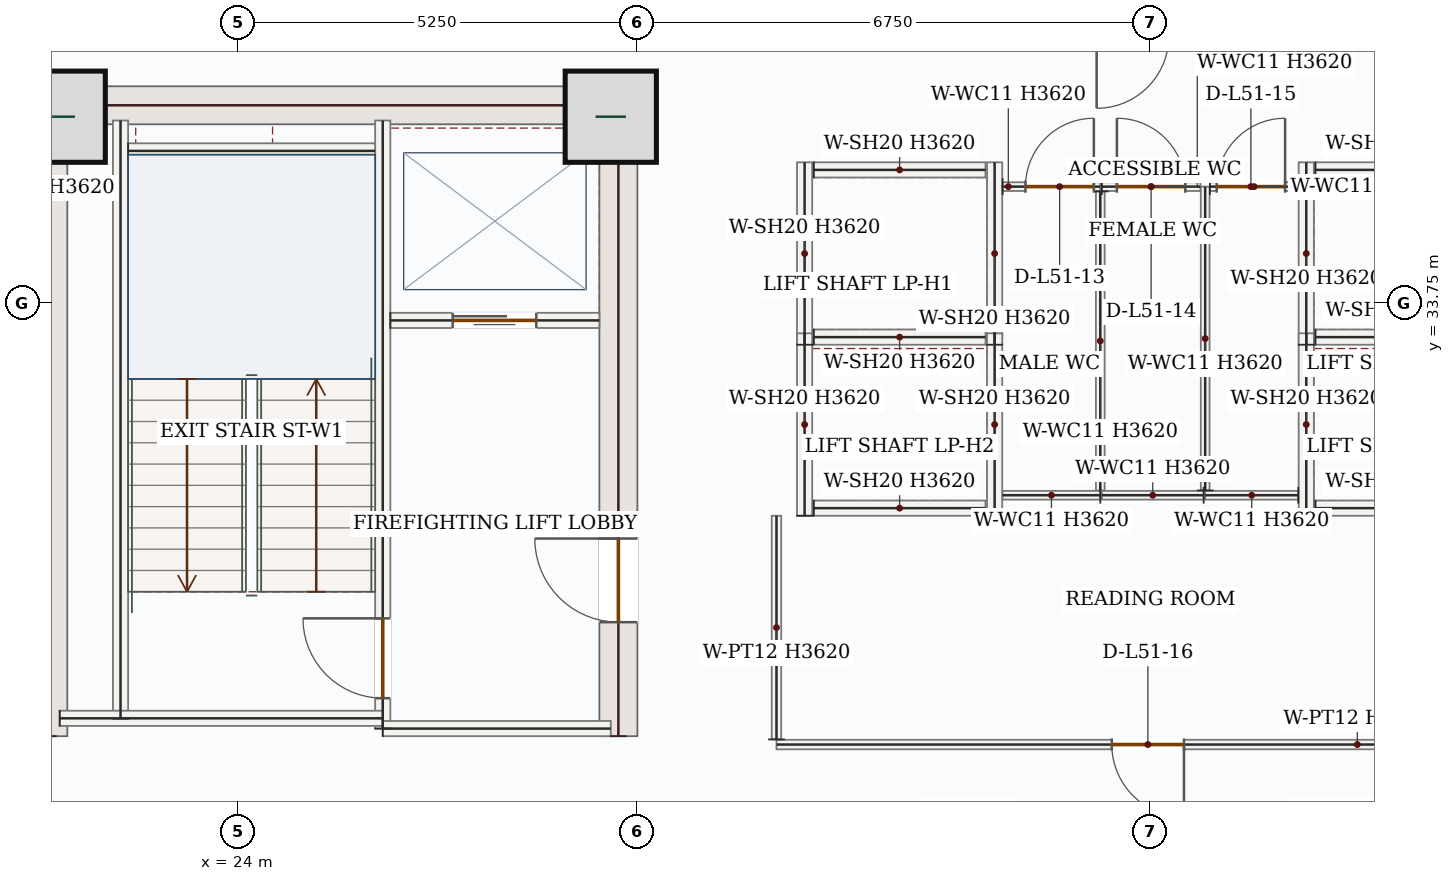
"""IFC4 building model, lengths in metres.
Left out: names, types, materials, properties, quantities, classifications, styles, units other than length and angle.
Written with IfcOpenShell. Run it as: python <this file> out.ifc"""

import sys

from ifc_helpers import new_model, si_unit, direction, frame, frame_2d, origin, origin_2d, place, context, subcontext, project, spatial, rectangle, extrude, source, transform, mapped, element, fill, save


model = new_model("IFC4")
c1 = context("Model", 3, precision=1e-05, world=origin(), true_north=direction((0.0, 1.0)))
c2 = subcontext(c1, "Body", "Model", "MODEL_VIEW")
j1 = project(units=[si_unit("LENGTHUNIT", "METRE"), si_unit("PLANEANGLEUNIT", "RADIAN")], contexts=[c1])
p1 = place(None, origin())
s1 = spatial("IfcSite", under=j1, at=p1, CompositionType="ELEMENT")
p2 = place(p1, origin())
s2 = spatial("IfcBuilding", under=s1, at=p2, CompositionType="ELEMENT")
p3 = place(p2, frame((0.0, 0.0, 217.5)))
s3 = spatial("IfcBuildingStorey", under=s2, at=p3, CompositionType="ELEMENT", Elevation=217.5)
m1 = source(origin(), c2, "Body", "SweptSolid", [
    extrude(rectangle(XDim=8.55, YDim=0.5, at=frame_2d((4.275, 0.0))), origin(), (0.0, 0.0, 1.0), 3.62),
])
p4 = place(p3, frame((21.5, 28.05, 0.0), z_axis=(0.0, 0.0, 1.0), x_axis=(0.0, 1.0, 0.0)))
e1 = element("IfcWall", 1, at=p4, inside=s3, PredefinedType="SHEAR", context=c2, shape_type="MappedRepresentation", body=[
    mapped(m1, transform((0.0, 0.0, 0.0), x_axis=(1.0, 0.0, 0.0), y_axis=(0.0, 1.0, 0.0), z_axis=(0.0, 0.0, 1.0), scale=1.0)),
])
p5 = place(p3, frame((29.0, 28.05, 0.0), z_axis=(0.0, 0.0, 1.0), x_axis=(0.0, 1.0, 0.0)))
e2 = element("IfcWall", 2, at=p5, inside=s3, PredefinedType="SHEAR", context=c2, shape_type="SweptSolid", body=[
    extrude(rectangle(XDim=8.55, YDim=0.5, at=frame_2d((4.275, 0.0))), origin(), (0.0, 0.0, 1.0), 3.62),
])
p6 = place(p5, frame((1.5, 0.0, 0.0)))
e3 = element("IfcOpeningElement", 3, at=p6, cuts=e2, PredefinedType="OPENING", context=c2, shape_type="SweptSolid", body=[
    extrude(rectangle(XDim=1.1, YDim=2.2, at=frame_2d((0.55, 1.1))), frame((0.0, 0.26, 0.0), z_axis=(0.0, -1.0, 0.0), x_axis=(1.0, 0.0, 0.0)), (0.0, 0.0, 1.0), 0.52),
])
m2 = source(origin(), c2, "Body", "SweptSolid", [
    extrude(rectangle(XDim=7.0, YDim=0.5, at=frame_2d((3.5, 0.0))), origin(), (0.0, 0.0, 1.0), 3.62),
])
p7 = place(p3, frame((21.75, 36.35, 0.0), z_axis=(0.0, 0.0, 1.0), x_axis=(1.0, 0.0, 0.0)))
e4 = element("IfcWall", 4, at=p7, inside=s3, PredefinedType="SHEAR", context=c2, shape_type="MappedRepresentation", body=[
    mapped(m2, transform((0.0, 0.0, 0.0), x_axis=(1.0, 0.0, 0.0), y_axis=(0.0, 1.0, 0.0), z_axis=(0.0, 0.0, 1.0), scale=1.0)),
])
m3 = source(origin(), c2, "Body", "SweptSolid", [
    extrude(rectangle(XDim=1.2, YDim=1.2, at=origin_2d()), origin(), (0.0, 0.0, 1.0), 3.9),
])
for number, where, z_axis, x_axis in (
    (5, (21.65, 36.2, 0.0), (0.0, 0.0, 1.0), (1.0, 0.0, 0.0)),
    (6, (28.9, 36.2, 0.0), (0.0, 0.0, 1.0), (1.0, 0.0, 0.0)),
):
    element("IfcColumn", number, at=place(p3, frame(where, z_axis=z_axis, x_axis=x_axis)), inside=s3, PredefinedType="COLUMN", context=c2, shape_type="MappedRepresentation", body=[
        mapped(m3, transform((0.0, 0.0, 0.0), x_axis=(1.0, 0.0, 0.0), y_axis=(0.0, 1.0, 0.0), z_axis=(0.0, 0.0, 1.0), scale=1.0)),
    ])
m4 = source(origin(), c2, "Body", "SweptSolid", [
    extrude(rectangle(XDim=5.258, YDim=0.28, at=frame_2d((2.629, 0.0))), origin(), (0.0, 0.0, 1.0), 3.62),
])
p8 = place(p3, frame((18.94, 35.542, 0.0), z_axis=(0.0, 0.0, 1.0), x_axis=(0.707106781187, 0.707106781187, 0.0)))
e7 = element("IfcWall", 7, at=p8, inside=s3, PredefinedType="SOLIDWALL", context=c2, shape_type="MappedRepresentation", body=[
    mapped(m4, transform((0.0, 0.0, 0.0), x_axis=(1.0, 0.0, 0.0), y_axis=(0.0, 1.0, 0.0), z_axis=(0.0, 0.0, 1.0), scale=1.0)),
])
m5 = source(origin(), c2, "Body", "SweptSolid", [
    extrude(rectangle(XDim=7.87, YDim=0.2, at=frame_2d((3.935, 0.0))), origin(), (0.0, 0.0, 1.0), 3.62),
])
p9 = place(p3, frame((22.45, 28.28, 0.0), z_axis=(0.0, 0.0, 1.0), x_axis=(0.0, 1.0, 0.0)))
e8 = element("IfcWall", 8, at=p9, inside=s3, PredefinedType="SOLIDWALL", context=c2, shape_type="MappedRepresentation", body=[
    mapped(m5, transform((0.0, 0.0, 0.0), x_axis=(1.0, 0.0, 0.0), y_axis=(0.0, 1.0, 0.0), z_axis=(0.0, 0.0, 1.0), scale=1.0)),
])
p10 = place(p3, frame((25.9, 28.15, 0.0), z_axis=(0.0, 0.0, 1.0), x_axis=(0.0, 1.0, 0.0)))
e9 = element("IfcWall", 9, at=p10, inside=s3, PredefinedType="SOLIDWALL", context=c2, shape_type="SweptSolid", body=[
    extrude(rectangle(XDim=8.0, YDim=0.2, at=frame_2d((4.0, 0.0))), origin(), (0.0, 0.0, 1.0), 3.62),
])
p11 = place(p10, frame((0.4, 0.0, 0.0)))
e10 = element("IfcOpeningElement", 10, at=p11, cuts=e9, PredefinedType="OPENING", context=c2, shape_type="SweptSolid", body=[
    extrude(rectangle(XDim=1.05, YDim=2.15, at=frame_2d((0.525, 1.075))), frame((0.0, 0.11, 0.0), z_axis=(0.0, -1.0, 0.0), x_axis=(1.0, 0.0, 0.0)), (0.0, 0.0, 1.0), 0.22),
])
m6 = source(origin(), c2, "Body", "SweptSolid", [
    extrude(rectangle(XDim=4.25, YDim=0.2, at=frame_2d((2.125, 0.0))), origin(), (0.0, 0.0, 1.0), 3.62),
])
p12 = place(p3, frame((21.65, 28.285, 0.0), z_axis=(0.0, 0.0, 1.0), x_axis=(1.0, 0.0, 0.0)))
e11 = element("IfcWall", 11, at=p12, inside=s3, PredefinedType="SOLIDWALL", context=c2, shape_type="MappedRepresentation", body=[
    mapped(m6, transform((0.0, 0.0, 0.0), x_axis=(1.0, 0.0, 0.0), y_axis=(0.0, 1.0, 0.0), z_axis=(0.0, 0.0, 1.0), scale=1.0)),
])
m7 = source(origin(), c2, "Body", "SweptSolid", [
    extrude(rectangle(XDim=3.0, YDim=0.2, at=frame_2d((1.5, 0.0))), origin(), (0.0, 0.0, 1.0), 3.62),
])
p13 = place(p3, frame((25.9, 28.15, 0.0), z_axis=(0.0, 0.0, 1.0), x_axis=(1.0, 0.0, 0.0)))
e12 = element("IfcWall", 12, at=p13, inside=s3, PredefinedType="SOLIDWALL", context=c2, shape_type="MappedRepresentation", body=[
    mapped(m7, transform((0.0, 0.0, 0.0), x_axis=(1.0, 0.0, 0.0), y_axis=(0.0, 1.0, 0.0), z_axis=(0.0, 0.0, 1.0), scale=1.0)),
])
m8 = source(origin(), c2, "Body", "SweptSolid", [
    extrude(rectangle(XDim=3.25, YDim=0.2, at=frame_2d((1.625, 0.0))), origin(), (0.0, 0.0, 1.0), 3.62),
])
p14 = place(p3, frame((22.55, 35.75, 0.0), z_axis=(0.0, 0.0, 1.0), x_axis=(1.0, 0.0, 0.0)))
e13 = element("IfcWall", 13, at=p14, inside=s3, PredefinedType="SOLIDWALL", context=c2, shape_type="MappedRepresentation", body=[
    mapped(m8, transform((0.0, 0.0, 0.0), x_axis=(1.0, 0.0, 0.0), y_axis=(0.0, 1.0, 0.0), z_axis=(0.0, 0.0, 1.0), scale=1.0)),
])
p15 = place(p3, frame((26.0, 33.52, 0.0), z_axis=(0.0, 0.0, 1.0), x_axis=(1.0, 0.0, 0.0)))
e14 = element("IfcWall", 14, at=p15, inside=s3, PredefinedType="SOLIDWALL", context=c2, shape_type="SweptSolid", body=[
    extrude(rectangle(XDim=2.75, YDim=0.2, at=frame_2d((1.375, 0.0))), origin(), (0.0, 0.0, 1.0), 3.62),
])
p16 = place(p15, frame((0.82, 0.0, 0.0)))
e15 = element("IfcOpeningElement", 15, at=p16, cuts=e14, PredefinedType="OPENING", context=c2, shape_type="SweptSolid", body=[
    extrude(rectangle(XDim=1.1, YDim=2.15, at=frame_2d((0.55, 1.075))), frame((0.0, 0.11, 0.0), z_axis=(0.0, -1.0, 0.0), x_axis=(1.0, 0.0, 0.0)), (0.0, 0.0, 1.0), 0.22),
])
m9 = source(origin(), c2, "Body", "SweptSolid", [
    extrude(rectangle(XDim=2.4, YDim=0.2, at=frame_2d((1.2, 0.0))), origin(), (0.0, 0.0, 1.0), 3.62),
])
for number, where, z_axis, x_axis in (
    (16, (31.45, 33.2, 0.0), (0.0, 0.0, 1.0), (0.0, 1.0, 0.0)),
    (17, (33.95, 33.2, 0.0), (0.0, 0.0, 1.0), (0.0, 1.0, 0.0)),
):
    element("IfcWall", number, at=place(p3, frame(where, z_axis=z_axis, x_axis=x_axis)), inside=s3, PredefinedType="SOLIDWALL", context=c2, shape_type="MappedRepresentation", body=[
        mapped(m9, transform((0.0, 0.0, 0.0), x_axis=(1.0, 0.0, 0.0), y_axis=(0.0, 1.0, 0.0), z_axis=(0.0, 0.0, 1.0), scale=1.0)),
    ])
m10 = source(origin(), c2, "Body", "SweptSolid", [
    extrude(rectangle(XDim=2.26, YDim=0.2, at=frame_2d((1.13, 0.0))), origin(), (0.0, 0.0, 1.0), 3.62),
])
for number, where, z_axis, x_axis in (
    (18, (31.57, 33.3, 0.0), (0.0, 0.0, 1.0), (1.0, 0.0, 0.0)),
    (19, (31.57, 35.5, 0.0), (0.0, 0.0, 1.0), (1.0, 0.0, 0.0)),
):
    element("IfcWall", number, at=place(p3, frame(where, z_axis=z_axis, x_axis=x_axis)), inside=s3, PredefinedType="SOLIDWALL", context=c2, shape_type="MappedRepresentation", body=[
        mapped(m10, transform((0.0, 0.0, 0.0), x_axis=(1.0, 0.0, 0.0), y_axis=(0.0, 1.0, 0.0), z_axis=(0.0, 0.0, 1.0), scale=1.0)),
    ])
for number, where, z_axis, x_axis in (
    (20, (31.45, 30.95, 0.0), (0.0, 0.0, 1.0), (0.0, 1.0, 0.0)),
    (21, (33.95, 30.95, 0.0), (0.0, 0.0, 1.0), (0.0, 1.0, 0.0)),
):
    element("IfcWall", number, at=place(p3, frame(where, z_axis=z_axis, x_axis=x_axis)), inside=s3, PredefinedType="SOLIDWALL", context=c2, shape_type="MappedRepresentation", body=[
        mapped(m9, transform((0.0, 0.0, 0.0), x_axis=(1.0, 0.0, 0.0), y_axis=(0.0, 1.0, 0.0), z_axis=(0.0, 0.0, 1.0), scale=1.0)),
    ])
p17 = place(p3, frame((31.57, 31.05, 0.0), z_axis=(0.0, 0.0, 1.0), x_axis=(1.0, 0.0, 0.0)))
e22 = element("IfcWall", 22, at=p17, inside=s3, PredefinedType="SOLIDWALL", context=c2, shape_type="MappedRepresentation", body=[
    mapped(m10, transform((0.0, 0.0, 0.0), x_axis=(1.0, 0.0, 0.0), y_axis=(0.0, 1.0, 0.0), z_axis=(0.0, 0.0, 1.0), scale=1.0)),
])
p18 = place(p3, frame((38.05, 33.2, 0.0), z_axis=(0.0, 0.0, 1.0), x_axis=(0.0, 1.0, 0.0)))
e23 = element("IfcWall", 23, at=p18, inside=s3, PredefinedType="SOLIDWALL", context=c2, shape_type="MappedRepresentation", body=[
    mapped(m9, transform((0.0, 0.0, 0.0), x_axis=(1.0, 0.0, 0.0), y_axis=(0.0, 1.0, 0.0), z_axis=(0.0, 0.0, 1.0), scale=1.0)),
])
for number, where, z_axis, x_axis in (
    (24, (38.17, 33.3, 0.0), (0.0, 0.0, 1.0), (1.0, 0.0, 0.0)),
    (25, (38.17, 35.5, 0.0), (0.0, 0.0, 1.0), (1.0, 0.0, 0.0)),
):
    element("IfcWall", number, at=place(p3, frame(where, z_axis=z_axis, x_axis=x_axis)), inside=s3, PredefinedType="SOLIDWALL", context=c2, shape_type="MappedRepresentation", body=[
        mapped(m10, transform((0.0, 0.0, 0.0), x_axis=(1.0, 0.0, 0.0), y_axis=(0.0, 1.0, 0.0), z_axis=(0.0, 0.0, 1.0), scale=1.0)),
    ])
p19 = place(p3, frame((38.05, 30.95, 0.0), z_axis=(0.0, 0.0, 1.0), x_axis=(0.0, 1.0, 0.0)))
e26 = element("IfcWall", 26, at=p19, inside=s3, PredefinedType="SOLIDWALL", context=c2, shape_type="MappedRepresentation", body=[
    mapped(m9, transform((0.0, 0.0, 0.0), x_axis=(1.0, 0.0, 0.0), y_axis=(0.0, 1.0, 0.0), z_axis=(0.0, 0.0, 1.0), scale=1.0)),
])
p20 = place(p3, frame((38.17, 31.05, 0.0), z_axis=(0.0, 0.0, 1.0), x_axis=(1.0, 0.0, 0.0)))
e27 = element("IfcWall", 27, at=p20, inside=s3, PredefinedType="SOLIDWALL", context=c2, shape_type="MappedRepresentation", body=[
    mapped(m10, transform((0.0, 0.0, 0.0), x_axis=(1.0, 0.0, 0.0), y_axis=(0.0, 1.0, 0.0), z_axis=(0.0, 0.0, 1.0), scale=1.0)),
])
m11 = source(origin(), c2, "Body", "SweptSolid", [
    extrude(rectangle(XDim=1.225, YDim=0.115, at=frame_2d((0.613, 0.0))), origin(), (0.0, 0.0, 1.0), 3.62),
])
p21 = place(p3, frame((37.945, 31.22, 0.0), z_axis=(0.0, 0.0, 1.0), x_axis=(-1.0, 0.0, 0.0)))
e28 = element("IfcWall", 28, at=p21, inside=s3, PredefinedType="PARTITIONING", context=c2, shape_type="MappedRepresentation", body=[
    mapped(m11, transform((0.0, 0.0, 0.0), x_axis=(1.0, 0.0, 0.0), y_axis=(0.0, 1.0, 0.0), z_axis=(0.0, 0.0, 1.0), scale=1.0)),
])
m12 = source(origin(), c2, "Body", "SweptSolid", [
    extrude(rectangle(XDim=3.998, YDim=0.115, at=frame_2d((1.999, 0.0))), origin(), (0.0, 0.0, 1.0), 3.62),
])
p22 = place(p3, frame((36.72, 31.282, 0.0), z_axis=(0.0, 0.0, 1.0), x_axis=(0.0, 1.0, 0.0)))
e29 = element("IfcWall", 29, at=p22, inside=s3, PredefinedType="PARTITIONING", context=c2, shape_type="MappedRepresentation", body=[
    mapped(m12, transform((0.0, 0.0, 0.0), x_axis=(1.0, 0.0, 0.0), y_axis=(0.0, 1.0, 0.0), z_axis=(0.0, 0.0, 1.0), scale=1.0)),
])
p23 = place(p3, frame((36.782, 35.28, 0.0), z_axis=(0.0, 0.0, 1.0), x_axis=(1.0, 0.0, 0.0)))
e30 = element("IfcWall", 30, at=p23, inside=s3, PredefinedType="PARTITIONING", context=c2, shape_type="SweptSolid", body=[
    extrude(rectangle(XDim=1.163, YDim=0.115, at=frame_2d((0.581, 0.0))), origin(), (0.0, 0.0, 1.0), 3.62),
])
p24 = place(p23, frame((0.089, 0.0, 0.0)))
e31 = element("IfcOpeningElement", 31, at=p24, cuts=e30, PredefinedType="OPENING", context=c2, shape_type="SweptSolid", body=[
    extrude(rectangle(XDim=0.9, YDim=2.1, at=frame_2d((0.45, 1.05))), frame((0.0, 0.067, 0.0), z_axis=(0.0, -1.0, 0.0), x_axis=(1.0, 0.0, 0.0)), (0.0, 0.0, 1.0), 0.135),
])
m13 = source(origin(), c2, "Body", "SweptSolid", [
    extrude(rectangle(XDim=1.285, YDim=0.115, at=frame_2d((0.643, 0.0))), origin(), (0.0, 0.0, 1.0), 3.62),
])
p25 = place(p3, frame((35.34, 31.22, 0.0), z_axis=(0.0, 0.0, 1.0), x_axis=(-1.0, 0.0, 0.0)))
e32 = element("IfcWall", 32, at=p25, inside=s3, PredefinedType="PARTITIONING", context=c2, shape_type="MappedRepresentation", body=[
    mapped(m13, transform((0.0, 0.0, 0.0), x_axis=(1.0, 0.0, 0.0), y_axis=(0.0, 1.0, 0.0), z_axis=(0.0, 0.0, 1.0), scale=1.0)),
])
p26 = place(p3, frame((34.055, 35.28, 0.0), z_axis=(0.0, 0.0, 1.0), x_axis=(1.0, 0.0, 0.0)))
e33 = element("IfcWall", 33, at=p26, inside=s3, PredefinedType="PARTITIONING", context=c2, shape_type="SweptSolid", body=[
    extrude(rectangle(XDim=1.285, YDim=0.115, at=frame_2d((0.643, 0.0))), origin(), (0.0, 0.0, 1.0), 3.62),
])
p27 = place(p26, frame((0.3, 0.0, 0.0)))
e34 = element("IfcOpeningElement", 34, at=p27, cuts=e33, PredefinedType="OPENING", context=c2, shape_type="SweptSolid", body=[
    extrude(rectangle(XDim=0.9, YDim=2.1, at=frame_2d((0.45, 1.05))), frame((0.0, 0.067, 0.0), z_axis=(0.0, -1.0, 0.0), x_axis=(1.0, 0.0, 0.0)), (0.0, 0.0, 1.0), 0.135),
])
m14 = source(origin(), c2, "Body", "SweptSolid", [
    extrude(rectangle(XDim=3.935, YDim=0.115, at=frame_2d((1.968, 0.0))), origin(), (0.0, 0.0, 1.0), 3.62),
])
p28 = place(p3, frame((35.34, 35.218, 0.0), z_axis=(0.0, 0.0, 1.0), x_axis=(0.0, -1.0, 0.0)))
e35 = element("IfcWall", 35, at=p28, inside=s3, PredefinedType="PARTITIONING", context=c2, shape_type="MappedRepresentation", body=[
    mapped(m14, transform((0.0, 0.0, 0.0), x_axis=(1.0, 0.0, 0.0), y_axis=(0.0, 1.0, 0.0), z_axis=(0.0, 0.0, 1.0), scale=1.0)),
])
m15 = source(origin(), c2, "Body", "SweptSolid", [
    extrude(rectangle(XDim=1.34, YDim=0.115, at=frame_2d((0.67, 0.0))), origin(), (0.0, 0.0, 1.0), 3.62),
])
p29 = place(p3, frame((36.7, 31.22, 0.0), z_axis=(0.0, 0.0, 1.0), x_axis=(-1.0, 0.0, 0.0)))
e36 = element("IfcWall", 36, at=p29, inside=s3, PredefinedType="PARTITIONING", context=c2, shape_type="MappedRepresentation", body=[
    mapped(m15, transform((0.0, 0.0, 0.0), x_axis=(1.0, 0.0, 0.0), y_axis=(0.0, 1.0, 0.0), z_axis=(0.0, 0.0, 1.0), scale=1.0)),
])
p30 = place(p3, frame((35.36, 35.28, 0.0), z_axis=(0.0, 0.0, 1.0), x_axis=(1.0, 0.0, 0.0)))
e37 = element("IfcWall", 37, at=p30, inside=s3, PredefinedType="PARTITIONING", context=c2, shape_type="SweptSolid", body=[
    extrude(rectangle(XDim=1.297, YDim=0.115, at=frame_2d((0.649, 0.0))), origin(), (0.0, 0.0, 1.0), 3.62),
])
p31 = place(p30, frame((0.199, 0.0, 0.0)))
e38 = element("IfcOpeningElement", 38, at=p31, cuts=e37, PredefinedType="OPENING", context=c2, shape_type="SweptSolid", body=[
    extrude(rectangle(XDim=0.9, YDim=2.1, at=frame_2d((0.45, 1.05))), frame((0.0, 0.067, 0.0), z_axis=(0.0, -1.0, 0.0), x_axis=(1.0, 0.0, 0.0)), (0.0, 0.0, 1.0), 0.135),
])
p32 = place(p3, frame((40.853, 27.94, 0.0), z_axis=(0.0, 0.0, 1.0), x_axis=(-1.0, 0.0, 0.0)))
e39 = element("IfcWall", 39, at=p32, inside=s3, PredefinedType="PARTITIONING", context=c2, shape_type="SweptSolid", body=[
    extrude(rectangle(XDim=9.772, YDim=0.125, at=frame_2d((4.886, 0.0))), origin(), (0.0, 0.0, 1.0), 3.62),
])
p33 = place(p32, frame((4.411, 0.0, 0.0)))
e40 = element("IfcOpeningElement", 40, at=p33, cuts=e39, PredefinedType="OPENING", context=c2, shape_type="SweptSolid", body=[
    extrude(rectangle(XDim=0.95, YDim=2.15, at=frame_2d((0.475, 1.075))), frame((0.0, 0.073, 0.0), z_axis=(0.0, -1.0, 0.0), x_axis=(1.0, 0.0, 0.0)), (0.0, 0.0, 1.0), 0.145),
])
m16 = source(origin(), c2, "Body", "SweptSolid", [
    extrude(rectangle(XDim=2.942, YDim=0.125, at=frame_2d((1.471, 0.0))), origin(), (0.0, 0.0, 1.0), 3.62),
])
p34 = place(p3, frame((31.08, 28.008, 0.0), z_axis=(0.0, 0.0, 1.0), x_axis=(0.0, 1.0, 0.0)))
e41 = element("IfcWall", 41, at=p34, inside=s3, PredefinedType="PARTITIONING", context=c2, shape_type="MappedRepresentation", body=[
    mapped(m16, transform((0.0, 0.0, 0.0), x_axis=(1.0, 0.0, 0.0), y_axis=(0.0, 1.0, 0.0), z_axis=(0.0, 0.0, 1.0), scale=1.0)),
])
m17 = source(origin(), c2, "Body", "SweptSolid", [
    extrude(rectangle(XDim=1.05, YDim=2.15, at=frame_2d((0.525, 1.075))), frame((0.0, 0.025, 0.0), z_axis=(0.0, -1.0, 0.0), x_axis=(1.0, 0.0, 0.0)), (0.0, 0.0, 1.0), 0.05),
])
p35 = place(p11, origin())
e42 = element("IfcDoor", 42, at=p35, inside=s3, OperationType="SINGLE_SWING_RIGHT", PredefinedType="DOOR", context=c2, shape_type="MappedRepresentation", body=[
    mapped(m17, transform((0.0, 0.0, 0.0), x_axis=(1.0, 0.0, 0.0), y_axis=(0.0, 1.0, 0.0), z_axis=(0.0, 0.0, 1.0), scale=1.0)),
])
fill(e10, e42)
m18 = source(origin(), c2, "Body", "SweptSolid", [
    extrude(rectangle(XDim=1.1, YDim=2.15, at=frame_2d((0.55, 1.075))), frame((0.0, 0.025, 0.0), z_axis=(0.0, -1.0, 0.0), x_axis=(1.0, 0.0, 0.0)), (0.0, 0.0, 1.0), 0.05),
])
p36 = place(p16, origin())
e43 = element("IfcDoor", 43, at=p36, inside=s3, OperationType="DOUBLE_DOOR_SLIDING", PredefinedType="DOOR", context=c2, shape_type="MappedRepresentation", body=[
    mapped(m18, transform((0.0, 0.0, 0.0), x_axis=(1.0, 0.0, 0.0), y_axis=(0.0, 1.0, 0.0), z_axis=(0.0, 0.0, 1.0), scale=1.0)),
])
fill(e15, e43)
m19 = source(origin(), c2, "Body", "SweptSolid", [
    extrude(rectangle(XDim=1.1, YDim=2.2, at=frame_2d((0.55, 1.1))), frame((0.0, 0.025, 0.0), z_axis=(0.0, -1.0, 0.0), x_axis=(1.0, 0.0, 0.0)), (0.0, 0.0, 1.0), 0.05),
])
p37 = place(p6, origin())
e44 = element("IfcDoor", 44, at=p37, inside=s3, OperationType="SINGLE_SWING_RIGHT", PredefinedType="DOOR", context=c2, shape_type="MappedRepresentation", body=[
    mapped(m19, transform((0.0, 0.0, 0.0), x_axis=(1.0, 0.0, 0.0), y_axis=(0.0, 1.0, 0.0), z_axis=(0.0, 0.0, 1.0), scale=1.0)),
])
fill(e3, e44)
m20 = source(origin(), c2, "Body", "SweptSolid", [
    extrude(rectangle(XDim=0.9, YDim=2.1, at=frame_2d((0.45, 1.05))), frame((0.0, 0.025, 0.0), z_axis=(0.0, -1.0, 0.0), x_axis=(1.0, 0.0, 0.0)), (0.0, 0.0, 1.0), 0.05),
])
p38 = place(p27, origin())
e45 = element("IfcDoor", 45, at=p38, inside=s3, OperationType="SINGLE_SWING_RIGHT", PredefinedType="DOOR", context=c2, shape_type="MappedRepresentation", body=[
    mapped(m20, transform((0.0, 0.0, 0.0), x_axis=(1.0, 0.0, 0.0), y_axis=(0.0, 1.0, 0.0), z_axis=(0.0, 0.0, 1.0), scale=1.0)),
])
fill(e34, e45)
p39 = place(p31, origin())
e46 = element("IfcDoor", 46, at=p39, inside=s3, OperationType="SINGLE_SWING_LEFT", PredefinedType="DOOR", context=c2, shape_type="MappedRepresentation", body=[
    mapped(m20, transform((0.0, 0.0, 0.0), x_axis=(1.0, 0.0, 0.0), y_axis=(0.0, 1.0, 0.0), z_axis=(0.0, 0.0, 1.0), scale=1.0)),
])
fill(e38, e46)
p40 = place(p24, origin())
e47 = element("IfcDoor", 47, at=p40, inside=s3, OperationType="SINGLE_SWING_RIGHT", PredefinedType="DOOR", context=c2, shape_type="MappedRepresentation", body=[
    mapped(m20, transform((0.0, 0.0, 0.0), x_axis=(1.0, 0.0, 0.0), y_axis=(0.0, 1.0, 0.0), z_axis=(0.0, 0.0, 1.0), scale=1.0)),
])
fill(e31, e47)
m21 = source(origin(), c2, "Body", "SweptSolid", [
    extrude(rectangle(XDim=0.95, YDim=2.15, at=frame_2d((0.475, 1.075))), frame((0.0, 0.025, 0.0), z_axis=(0.0, -1.0, 0.0), x_axis=(1.0, 0.0, 0.0)), (0.0, 0.0, 1.0), 0.05),
])
p41 = place(p33, origin())
e48 = element("IfcDoor", 48, at=p41, inside=s3, OperationType="SINGLE_SWING_LEFT", PredefinedType="DOOR", context=c2, shape_type="MappedRepresentation", body=[
    mapped(m21, transform((0.0, 0.0, 0.0), x_axis=(1.0, 0.0, 0.0), y_axis=(0.0, 1.0, 0.0), z_axis=(0.0, 0.0, 1.0), scale=1.0)),
])
fill(e40, e48)
save(model, sys.argv[1])
